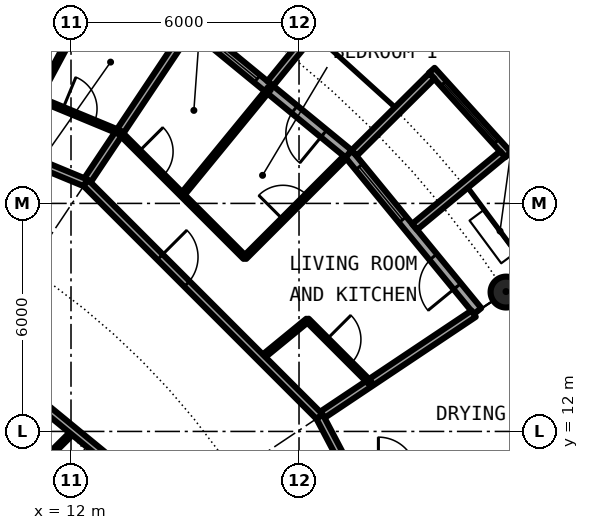
"""IFC4 building model, lengths in metres.
Left out: names, types, materials, properties, quantities, classifications, styles, units other than length and angle.
Written with IfcOpenShell. Run it as: python <this file> out.ifc"""

import sys

from ifc_helpers import new_model, si_unit, direction, frame, frame_2d, origin, origin_2d, place, context, subcontext, project, spatial, rectangle, circle, hollow_circle, extrude, element, fill, save


model = new_model("IFC4")
c1 = context("Model", 3, precision=1e-05, world=origin(), true_north=direction((0.0, 1.0)))
c2 = subcontext(c1, "Body", "Model", "MODEL_VIEW")
j1 = project(units=[si_unit("LENGTHUNIT", "METRE"), si_unit("PLANEANGLEUNIT", "RADIAN")], contexts=[c1])
p1 = place(None, origin())
s1 = spatial("IfcSite", under=j1, at=p1, CompositionType="ELEMENT")
p2 = place(p1, origin())
s2 = spatial("IfcBuilding", under=s1, at=p2, CompositionType="ELEMENT")
p3 = place(p2, frame((0.0, 0.0, 173.8)))
s3 = spatial("IfcBuildingStorey", under=s2, at=p3, CompositionType="ELEMENT", Elevation=173.8)
p4 = place(p3, frame((23.448, 15.667, 0.0), z_axis=(0.0, 0.0, 1.0), x_axis=(1.0, 0.0, 0.0)))
e1 = element("IfcColumn", 1, at=p4, inside=s3, PredefinedType="COLUMN", context=c2, shape_type="SweptSolid", body=[
    extrude(hollow_circle(Radius=0.406, WallThickness=0.04, at=origin_2d()), origin(), (0.0, 0.0, 1.0), 3.05),
])
p5 = place(p3, frame((22.699, 15.167, 0.0), z_axis=(0.0, 0.0, 1.0), x_axis=(-0.634382322723, 0.773019449054, 0.0)))
e2 = element("IfcWall", 2, at=p5, inside=s3, PredefinedType="SOLIDWALL", context=c2, shape_type="SweptSolid", body=[
    extrude(rectangle(XDim=5.352, YDim=0.25, at=frame_2d((2.676, 0.0))), origin(), (0.0, 0.0, 1.0), 2.7),
])
p6 = place(p5, frame((0.841, 0.0, 0.0)))
e3 = element("IfcOpeningElement", 3, at=p6, cuts=e2, PredefinedType="OPENING", context=c2, shape_type="SweptSolid", body=[
    extrude(rectangle(XDim=1.0, YDim=2.2, at=frame_2d((0.5, 1.1))), frame((0.0, 0.135, 0.0), z_axis=(0.0, -1.0, 0.0), x_axis=(1.0, 0.0, 0.0)), (0.0, 0.0, 1.0), 0.27),
])
p7 = place(p5, frame((3.111, 0.0, 0.3)))
e4 = element("IfcOpeningElement", 4, at=p7, cuts=e2, PredefinedType="OPENING", context=c2, shape_type="SweptSolid", body=[
    extrude(rectangle(XDim=1.8, YDim=2.1, at=frame_2d((0.9, 1.05))), frame((0.0, 0.135, 0.0), z_axis=(0.0, -1.0, 0.0), x_axis=(1.0, 0.0, 0.0)), (0.0, 0.0, 1.0), 0.27),
])
p8 = place(p3, frame((23.503, 19.282, -0.03), z_axis=(0.0, 0.0, 1.0), x_axis=(-0.671506829416, 0.740998365753, 0.0)))
e5 = element("IfcWall", 5, at=p8, inside=s3, PredefinedType="SOLIDWALL", context=c2, shape_type="SweptSolid", body=[
    extrude(rectangle(XDim=2.993, YDim=0.2, at=frame_2d((1.497, 0.0))), origin(), (0.0, 0.0, 1.0), 2.73),
])
p9 = place(p8, frame((0.457, 0.0, 0.33)))
e6 = element("IfcOpeningElement", 6, at=p9, cuts=e5, PredefinedType="OPENING", context=c2, shape_type="SweptSolid", body=[
    extrude(circle(Radius=1.04, at=frame_2d((1.04, 1.04))), frame((0.0, 0.11, 0.0), z_axis=(0.0, -1.0, 0.0), x_axis=(1.0, 0.0, 0.0)), (0.0, 0.0, 1.0), 0.22),
])
p10 = place(p3, frame((21.041, 17.384, -0.03), z_axis=(0.0, 0.0, 1.0), x_axis=(0.770784861449, 0.63709551667, 0.0)))
e7 = element("IfcWall", 7, at=p10, inside=s3, PredefinedType="SOLIDWALL", context=c2, shape_type="SweptSolid", body=[
    extrude(rectangle(XDim=3.006, YDim=0.2, at=frame_2d((1.503, 0.0))), origin(), (0.0, 0.0, 1.0), 2.73),
])
p11 = place(p3, frame((19.45, 19.323, -0.03), z_axis=(0.0, 0.0, 1.0), x_axis=(0.709727076896, 0.704476739375, 0.0)))
e8 = element("IfcWall", 8, at=p11, inside=s3, PredefinedType="SOLIDWALL", context=c2, shape_type="SweptSolid", body=[
    extrude(rectangle(XDim=2.883, YDim=0.2, at=frame_2d((1.441, 0.0))), origin(), (0.0, 0.0, 1.0), 2.73),
])
p12 = place(p3, frame((19.304, 19.304, 0.0), z_axis=(0.0, 0.0, 1.0), x_axis=(-0.773019449054, 0.634382322723, 0.0)))
e9 = element("IfcWall", 9, at=p12, inside=s3, PredefinedType="SOLIDWALL", context=c2, shape_type="SweptSolid", body=[
    extrude(rectangle(XDim=5.352, YDim=0.25, at=frame_2d((2.676, 0.0))), origin(), (0.0, 0.0, 1.0), 2.7),
])
p13 = place(p12, frame((0.841, 0.0, 0.0)))
e10 = element("IfcOpeningElement", 10, at=p13, cuts=e9, PredefinedType="OPENING", context=c2, shape_type="SweptSolid", body=[
    extrude(rectangle(XDim=1.0, YDim=2.2, at=frame_2d((0.5, 1.1))), frame((0.0, 0.135, 0.0), z_axis=(0.0, -1.0, 0.0), x_axis=(1.0, 0.0, 0.0)), (0.0, 0.0, 1.0), 0.27),
])
p14 = place(p12, frame((3.111, 0.0, 0.3)))
e11 = element("IfcOpeningElement", 11, at=p14, cuts=e9, PredefinedType="OPENING", context=c2, shape_type="SweptSolid", body=[
    extrude(rectangle(XDim=1.8, YDim=2.1, at=frame_2d((0.9, 1.05))), frame((0.0, 0.135, 0.0), z_axis=(0.0, -1.0, 0.0), x_axis=(1.0, 0.0, 0.0)), (0.0, 0.0, 1.0), 0.27),
])
p15 = place(p3, frame((17.246, 21.155, -0.03), z_axis=(0.0, 0.0, 1.0), x_axis=(0.631741648902, 0.775179004516, 0.0)))
e12 = element("IfcWall", 12, at=p15, inside=s3, PredefinedType="SOLIDWALL", context=c2, shape_type="SweptSolid", body=[
    extrude(rectangle(XDim=3.006, YDim=0.2, at=frame_2d((1.503, 0.0))), origin(), (0.0, 0.0, 1.0), 2.73),
])
p16 = place(p3, frame((17.004, 13.927, 0.0), z_axis=(0.0, 0.0, 1.0), x_axis=(0.773446828454, 0.633861186344, 0.0)))
e13 = element("IfcWall", 13, at=p16, inside=s3, PredefinedType="PARTITIONING", context=c2, shape_type="SweptSolid", body=[
    extrude(rectangle(XDim=1.578, YDim=0.1, at=frame_2d((0.789, 0.0))), origin(), (0.0, 0.0, 1.0), 2.7),
])
p17 = place(p3, frame((9.148, 9.1, 0.0), z_axis=(0.0, 0.0, 1.0), x_axis=(0.708822693149, 0.705386695138, 0.0)))
e14 = element("IfcWall", 14, at=p17, inside=s3, PredefinedType="PARTITIONING", context=c2, shape_type="SweptSolid", body=[
    extrude(rectangle(XDim=4.121, YDim=0.1, at=frame_2d((2.061, 0.0))), origin(), (0.0, 0.0, 1.0), 2.7),
])
p18 = place(p17, frame((1.611, 0.0, 0.0)))
e15 = element("IfcOpeningElement", 15, at=p18, cuts=e14, PredefinedType="OPENING", context=c2, shape_type="SweptSolid", body=[
    extrude(rectangle(XDim=0.9, YDim=2.3, at=frame_2d((0.45, 1.15))), frame((0.0, 0.06, 0.0), z_axis=(0.0, -1.0, 0.0), x_axis=(1.0, 0.0, 0.0)), (0.0, 0.0, 1.0), 0.12),
])
p19 = place(p3, frame((11.124, 20.764, 0.0), z_axis=(0.0, 0.0, 1.0), x_axis=(0.472212052488, 0.881484984265, 0.0)))
e16 = element("IfcWall", 16, at=p19, inside=s3, PredefinedType="PARTITIONING", context=c2, shape_type="SweptSolid", body=[
    extrude(rectangle(XDim=3.619, YDim=0.1, at=frame_2d((1.81, 0.0))), origin(), (0.0, 0.0, 1.0), 2.7),
])
p20 = place(p3, frame((12.389, 18.542, 0.0), z_axis=(0.0, 0.0, 1.0), x_axis=(0.55569370664, 0.831387096605, 0.0)))
e17 = element("IfcWall", 17, at=p20, inside=s3, PredefinedType="PARTITIONING", context=c2, shape_type="SweptSolid", body=[
    extrude(rectangle(XDim=4.875, YDim=0.2, at=frame_2d((2.438, 0.0))), origin(), (0.0, 0.0, 1.0), 2.7),
])
p21 = place(p3, frame((14.927, 18.224, 0.0), z_axis=(0.0, 0.0, 1.0), x_axis=(0.633737383709, 0.773548271597, 0.0)))
e18 = element("IfcWall", 18, at=p21, inside=s3, PredefinedType="PARTITIONING", context=c2, shape_type="SweptSolid", body=[
    extrude(rectangle(XDim=3.618, YDim=0.1, at=frame_2d((1.809, 0.0))), origin(), (0.0, 0.0, 1.0), 2.7),
])
p22 = place(p3, frame((16.575, 16.575, 0.0), z_axis=(0.0, 0.0, 1.0), x_axis=(0.707106781187, 0.707106781187, 0.0)))
e19 = element("IfcWall", 19, at=p22, inside=s3, PredefinedType="PARTITIONING", context=c2, shape_type="SweptSolid", body=[
    extrude(rectangle(XDim=3.735, YDim=0.1, at=frame_2d((1.868, 0.0))), origin(), (0.0, 0.0, 1.0), 2.7),
])
p23 = place(p22, frame((1.417, 0.0, 0.0)))
e20 = element("IfcOpeningElement", 20, at=p23, cuts=e19, PredefinedType="OPENING", context=c2, shape_type="SweptSolid", body=[
    extrude(rectangle(XDim=0.9, YDim=2.3, at=frame_2d((0.45, 1.15))), frame((0.0, 0.06, 0.0), z_axis=(0.0, -1.0, 0.0), x_axis=(1.0, 0.0, 0.0)), (0.0, 0.0, 1.0), 0.12),
])
p24 = place(p3, frame((18.542, 12.389, 0.0), z_axis=(0.0, 0.0, 1.0), x_axis=(0.831387096605, 0.55569370664, 0.0)))
e21 = element("IfcWall", 21, at=p24, inside=s3, PredefinedType="PARTITIONING", context=c2, shape_type="SweptSolid", body=[
    extrude(rectangle(XDim=4.875, YDim=0.2, at=frame_2d((2.438, 0.0))), origin(), (0.0, 0.0, 1.0), 2.7),
])
p25 = place(p3, frame((6.773, 16.353, 0.0), z_axis=(0.0, 0.0, 1.0), x_axis=(0.773034536097, -0.634363938131, 0.0)))
e22 = element("IfcWall", 22, at=p25, inside=s3, PredefinedType="PARTITIONING", context=c2, shape_type="SweptSolid", body=[
    extrude(rectangle(XDim=10.277, YDim=0.2, at=frame_2d((5.138, 0.0))), origin(), (0.0, 0.0, 1.0), 2.7),
])
p26 = place(p25, frame((4.638, 0.0, 0.0)))
e23 = element("IfcOpeningElement", 23, at=p26, cuts=e22, PredefinedType="OPENING", context=c2, shape_type="SweptSolid", body=[
    extrude(rectangle(XDim=1.0, YDim=2.3, at=frame_2d((0.5, 1.15))), frame((0.0, 0.11, 0.0), z_axis=(0.0, -1.0, 0.0), x_axis=(1.0, 0.0, 0.0)), (0.0, 0.0, 1.0), 0.22),
])
p27 = place(p3, frame((4.351, 21.872, 0.0), z_axis=(0.0, 0.0, 1.0), x_axis=(0.923722518166, -0.383062278792, 0.0)))
e24 = element("IfcWall", 24, at=p27, inside=s3, PredefinedType="PARTITIONING", context=c2, shape_type="SweptSolid", body=[
    extrude(rectangle(XDim=8.709, YDim=0.2, at=frame_2d((4.354, 0.0))), origin(), (0.0, 0.0, 1.0), 2.7),
])
p28 = place(p27, frame((4.938, 0.0, 0.0)))
e25 = element("IfcOpeningElement", 25, at=p28, cuts=e24, PredefinedType="OPENING", context=c2, shape_type="SweptSolid", body=[
    extrude(rectangle(XDim=1.0, YDim=2.3, at=frame_2d((0.5, 1.15))), frame((0.0, 0.11, 0.0), z_axis=(0.0, -1.0, 0.0), x_axis=(1.0, 0.0, 0.0)), (0.0, 0.0, 1.0), 0.22),
])
p29 = place(p3, frame((12.389, 18.542, 0.0), z_axis=(0.0, 0.0, 1.0), x_axis=(0.707106781187, -0.707106781187, 0.0)))
e26 = element("IfcWall", 26, at=p29, inside=s3, PredefinedType="PARTITIONING", context=c2, shape_type="SweptSolid", body=[
    extrude(rectangle(XDim=8.702, YDim=0.2, at=frame_2d((4.351, 0.0))), origin(), (0.0, 0.0, 1.0), 2.7),
])
p30 = place(p29, frame((2.763, 0.0, 0.0)))
e27 = element("IfcOpeningElement", 27, at=p30, cuts=e26, PredefinedType="OPENING", context=c2, shape_type="SweptSolid", body=[
    extrude(rectangle(XDim=1.0, YDim=2.3, at=frame_2d((0.5, 1.15))), frame((0.0, 0.11, 0.0), z_axis=(0.0, -1.0, 0.0), x_axis=(1.0, 0.0, 0.0)), (0.0, 0.0, 1.0), 0.22),
])
p31 = place(p3, frame((18.542, 12.389, 0.0), z_axis=(0.0, 0.0, 1.0), x_axis=(0.465605550524, -0.884992356646, 0.0)))
e28 = element("IfcWall", 28, at=p31, inside=s3, PredefinedType="PARTITIONING", context=c2, shape_type="SweptSolid", body=[
    extrude(rectangle(XDim=1.643, YDim=0.2, at=frame_2d((0.821, 0.0))), origin(), (0.0, 0.0, 1.0), 2.7),
])
p32 = place(p3, frame((8.97, 21.656, 0.0), z_axis=(0.0, 0.0, 1.0), x_axis=(0.923920484476, -0.38258455061, 0.0)))
e29 = element("IfcWall", 29, at=p32, inside=s3, PredefinedType="PARTITIONING", context=c2, shape_type="SweptSolid", body=[
    extrude(rectangle(XDim=4.663, YDim=0.1, at=frame_2d((2.332, 0.0))), origin(), (0.0, 0.0, 1.0), 2.7),
])
p33 = place(p32, frame((3.047, 0.0, 0.0)))
e30 = element("IfcOpeningElement", 30, at=p33, cuts=e29, PredefinedType="OPENING", context=c2, shape_type="SweptSolid", body=[
    extrude(rectangle(XDim=0.9, YDim=2.3, at=frame_2d((0.45, 1.15))), frame((0.0, 0.06, 0.0), z_axis=(0.0, -1.0, 0.0), x_axis=(1.0, 0.0, 0.0)), (0.0, 0.0, 1.0), 0.12),
])
p34 = place(p3, frame((13.278, 19.872, 0.0), z_axis=(0.0, 0.0, 1.0), x_axis=(0.707080600289, -0.707132961115, 0.0)))
e31 = element("IfcWall", 31, at=p34, inside=s3, PredefinedType="PARTITIONING", context=c2, shape_type="SweptSolid", body=[
    extrude(rectangle(XDim=4.663, YDim=0.1, at=frame_2d((2.331, 0.0))), origin(), (0.0, 0.0, 1.0), 2.7),
])
p35 = place(p34, frame((0.719, 0.0, 0.0)))
e32 = element("IfcOpeningElement", 32, at=p35, cuts=e31, PredefinedType="OPENING", context=c2, shape_type="SweptSolid", body=[
    extrude(rectangle(XDim=0.9, YDim=2.3, at=frame_2d((0.45, 1.15))), frame((0.0, 0.06, 0.0), z_axis=(0.0, -1.0, 0.0), x_axis=(1.0, 0.0, 0.0)), (0.0, 0.0, 1.0), 0.12),
])
p36 = place(p3, frame((18.218, 14.932, 0.0), z_axis=(0.0, 0.0, 1.0), x_axis=(0.707106781187, -0.707106781187, 0.0)))
e33 = element("IfcWall", 33, at=p36, inside=s3, PredefinedType="PARTITIONING", context=c2, shape_type="SweptSolid", body=[
    extrude(rectangle(XDim=2.332, YDim=0.1, at=frame_2d((1.166, 0.0))), origin(), (0.0, 0.0, 1.0), 2.7),
])
p37 = place(p36, frame((0.723, 0.0, 0.0)))
e34 = element("IfcOpeningElement", 34, at=p37, cuts=e33, PredefinedType="OPENING", context=c2, shape_type="SweptSolid", body=[
    extrude(rectangle(XDim=0.9, YDim=2.3, at=frame_2d((0.45, 1.15))), frame((0.0, 0.06, 0.0), z_axis=(0.0, -1.0, 0.0), x_axis=(1.0, 0.0, 0.0)), (0.0, 0.0, 1.0), 0.12),
])
p38 = place(p6, origin())
e35 = element("IfcDoor", 35, at=p38, inside=s3, OperationType="SINGLE_SWING_LEFT", PredefinedType="DOOR", context=c2, shape_type="SweptSolid", body=[
    extrude(rectangle(XDim=1.0, YDim=2.2, at=frame_2d((0.5, 1.1))), frame((0.0, 0.025, 0.0), z_axis=(0.0, -1.0, 0.0), x_axis=(1.0, 0.0, 0.0)), (0.0, 0.0, 1.0), 0.05),
])
fill(e3, e35)
p39 = place(p7, origin())
e36 = element("IfcWindow", 36, at=p39, inside=s3, PartitioningType="SINGLE_PANEL", PredefinedType="WINDOW", context=c2, shape_type="SweptSolid", body=[
    extrude(rectangle(XDim=1.8, YDim=2.1, at=frame_2d((0.9, 1.05))), frame((0.0, 0.03, 0.0), z_axis=(0.0, -1.0, 0.0), x_axis=(1.0, 0.0, 0.0)), (0.0, 0.0, 1.0), 0.06),
])
fill(e4, e36)
p40 = place(p9, origin())
e37 = element("IfcWindow", 37, at=p40, inside=s3, PartitioningType="SINGLE_PANEL", PredefinedType="WINDOW", context=c2, shape_type="SweptSolid", body=[
    extrude(circle(Radius=1.04, at=frame_2d((1.04, 1.04))), frame((0.0, 0.03, 0.0), z_axis=(0.0, -1.0, 0.0), x_axis=(1.0, 0.0, 0.0)), (0.0, 0.0, 1.0), 0.06),
])
fill(e6, e37)
p41 = place(p13, origin())
e38 = element("IfcDoor", 38, at=p41, inside=s3, OperationType="SINGLE_SWING_LEFT", PredefinedType="DOOR", context=c2, shape_type="SweptSolid", body=[
    extrude(rectangle(XDim=1.0, YDim=2.2, at=frame_2d((0.5, 1.1))), frame((0.0, 0.025, 0.0), z_axis=(0.0, -1.0, 0.0), x_axis=(1.0, 0.0, 0.0)), (0.0, 0.0, 1.0), 0.05),
])
fill(e10, e38)
p42 = place(p14, origin())
e39 = element("IfcWindow", 39, at=p42, inside=s3, PartitioningType="SINGLE_PANEL", PredefinedType="WINDOW", context=c2, shape_type="SweptSolid", body=[
    extrude(rectangle(XDim=1.8, YDim=2.1, at=frame_2d((0.9, 1.05))), frame((0.0, 0.03, 0.0), z_axis=(0.0, -1.0, 0.0), x_axis=(1.0, 0.0, 0.0)), (0.0, 0.0, 1.0), 0.06),
])
fill(e11, e39)
p43 = place(p30, origin())
e40 = element("IfcDoor", 40, at=p43, inside=s3, OperationType="SINGLE_SWING_LEFT", PredefinedType="DOOR", context=c2, shape_type="SweptSolid", body=[
    extrude(rectangle(XDim=1.0, YDim=2.3, at=frame_2d((0.5, 1.15))), frame((0.0, 0.025, 0.0), z_axis=(0.0, -1.0, 0.0), x_axis=(1.0, 0.0, 0.0)), (0.0, 0.0, 1.0), 0.05),
])
fill(e27, e40)
p44 = place(p37, origin())
e41 = element("IfcDoor", 41, at=p44, inside=s3, OperationType="SINGLE_SWING_RIGHT", PredefinedType="DOOR", context=c2, shape_type="SweptSolid", body=[
    extrude(rectangle(XDim=0.9, YDim=2.3, at=frame_2d((0.45, 1.15))), frame((0.0, 0.025, 0.0), z_axis=(0.0, -1.0, 0.0), x_axis=(1.0, 0.0, 0.0)), (0.0, 0.0, 1.0), 0.05),
])
fill(e34, e41)
p45 = place(p23, origin())
e42 = element("IfcDoor", 42, at=p45, inside=s3, OperationType="SINGLE_SWING_RIGHT", PredefinedType="DOOR", context=c2, shape_type="SweptSolid", body=[
    extrude(rectangle(XDim=0.9, YDim=2.3, at=frame_2d((0.45, 1.15))), frame((0.0, 0.025, 0.0), z_axis=(0.0, -1.0, 0.0), x_axis=(1.0, 0.0, 0.0)), (0.0, 0.0, 1.0), 0.05),
])
fill(e20, e42)
p46 = place(p35, origin())
e43 = element("IfcDoor", 43, at=p46, inside=s3, OperationType="SINGLE_SWING_LEFT", PredefinedType="DOOR", context=c2, shape_type="SweptSolid", body=[
    extrude(rectangle(XDim=0.9, YDim=2.3, at=frame_2d((0.45, 1.15))), frame((0.0, 0.025, 0.0), z_axis=(0.0, -1.0, 0.0), x_axis=(1.0, 0.0, 0.0)), (0.0, 0.0, 1.0), 0.05),
])
fill(e32, e43)
p47 = place(p33, origin())
e44 = element("IfcDoor", 44, at=p47, inside=s3, OperationType="SINGLE_SWING_RIGHT", PredefinedType="DOOR", context=c2, shape_type="SweptSolid", body=[
    extrude(rectangle(XDim=0.9, YDim=2.3, at=frame_2d((0.45, 1.15))), frame((0.0, 0.025, 0.0), z_axis=(0.0, -1.0, 0.0), x_axis=(1.0, 0.0, 0.0)), (0.0, 0.0, 1.0), 0.05),
])
fill(e30, e44)
save(model, sys.argv[1])
